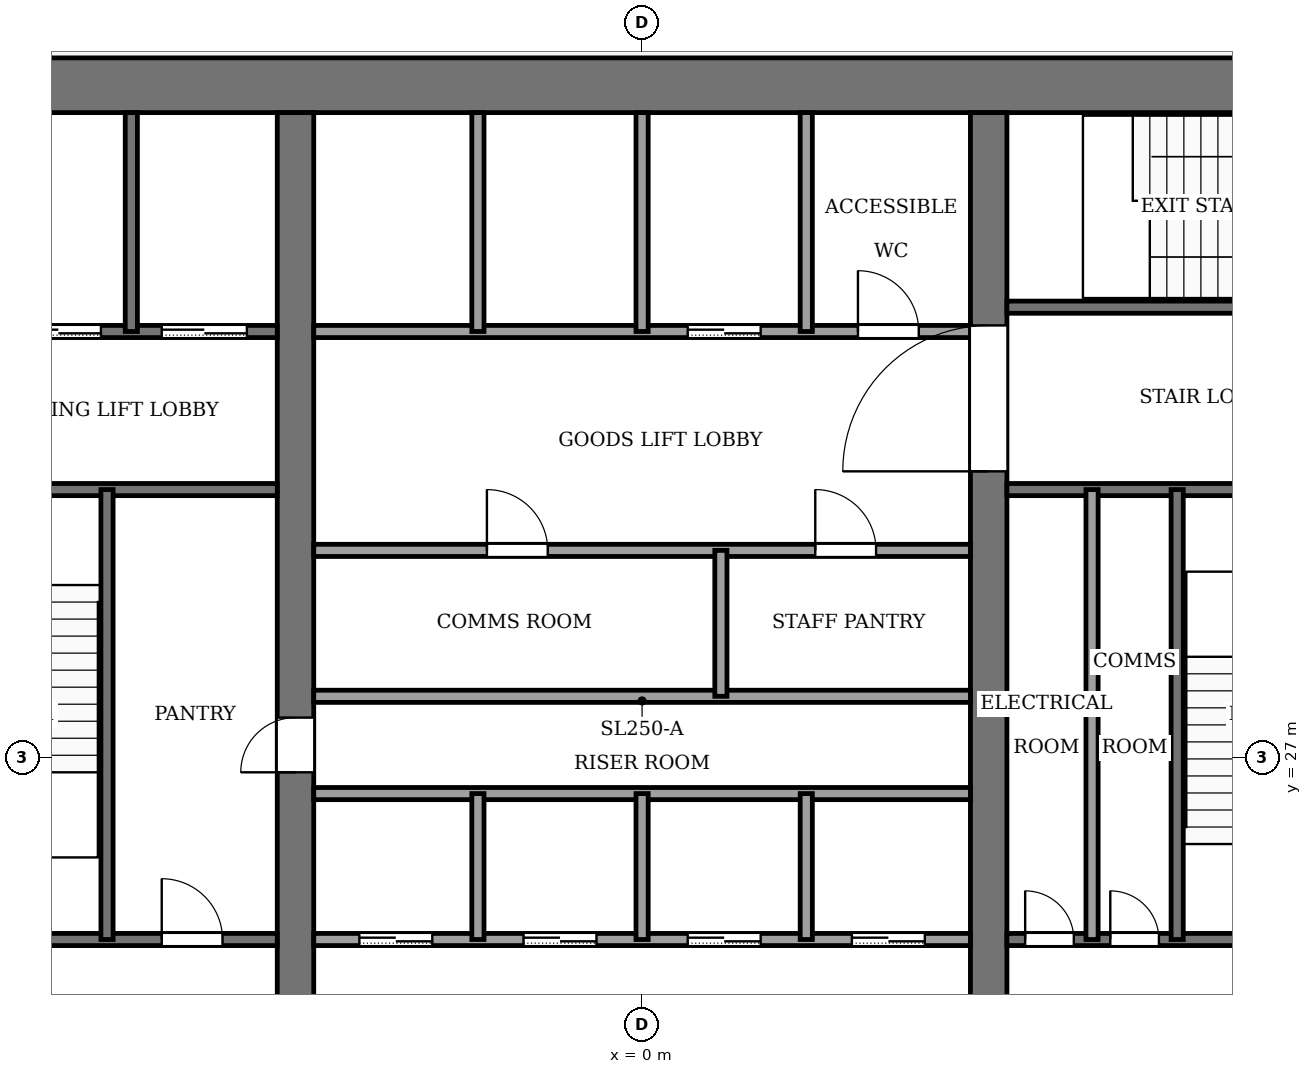
"""IFC4 building model, lengths in metres.
Left out: names, types, materials, properties, quantities, classifications, styles, units other than length and angle.
Written with IfcOpenShell. Run it as: python <this file> out.ifc"""

import sys

from ifc_helpers import new_model, si_unit, direction, frame, frame_2d, origin, place, context, subcontext, project, spatial, rectangle, extrude, element, fill, save


model = new_model("IFC4")
c1 = context("Model", 3, precision=1e-05, world=origin(), true_north=direction((0.0, 1.0)))
c2 = subcontext(c1, "Body", "Model", "MODEL_VIEW")
j1 = project(units=[si_unit("LENGTHUNIT", "METRE"), si_unit("PLANEANGLEUNIT", "RADIAN")], contexts=[c1])
p1 = place(None, origin())
s1 = spatial("IfcSite", under=j1, at=p1, CompositionType="ELEMENT")
p2 = place(p1, origin())
s2 = spatial("IfcBuilding", under=s1, at=p2, CompositionType="ELEMENT")
p3 = place(p2, frame((0.0, 0.0, 214.0)))
s3 = spatial("IfcBuildingStorey", under=s2, at=p3, CompositionType="ELEMENT", Elevation=214.0)
p4 = place(p3, frame((-13.5, 38.05, -0.13), z_axis=(0.0, 0.0, 1.0), x_axis=(1.0, 0.0, 0.0)))
e1 = element("IfcWall", 1, at=p4, inside=s3, PredefinedType="SHEAR", context=c2, shape_type="SweptSolid", body=[
    extrude(rectangle(XDim=27.0, YDim=0.9, at=frame_2d((13.5, 0.0))), origin(), (0.0, 0.0, 1.0), 4.0),
])
p5 = place(p3, frame((-5.7, 18.4, -0.13), z_axis=(0.0, 0.0, 1.0), x_axis=(0.0, 1.0, 0.0)))
e2 = element("IfcWall", 2, at=p5, inside=s3, PredefinedType="SHEAR", context=c2, shape_type="SweptSolid", body=[
    extrude(rectangle(XDim=19.2, YDim=0.6, at=frame_2d((9.6, 0.0))), origin(), (0.0, 0.0, 1.0), 4.0),
])
p6 = place(p5, frame((8.35, 0.0, 0.13)))
e3 = element("IfcOpeningElement", 3, at=p6, cuts=e2, PredefinedType="OPENING", context=c2, shape_type="SweptSolid", body=[
    extrude(rectangle(XDim=0.9, YDim=2.1, at=frame_2d((0.45, 1.05))), frame((0.0, 0.31, 0.0), z_axis=(0.0, -1.0, 0.0), x_axis=(1.0, 0.0, 0.0)), (0.0, 0.0, 1.0), 0.62),
])
p7 = place(p3, frame((5.7, 18.4, -0.13), z_axis=(0.0, 0.0, 1.0), x_axis=(0.0, 1.0, 0.0)))
e4 = element("IfcWall", 4, at=p7, inside=s3, PredefinedType="SHEAR", context=c2, shape_type="SweptSolid", body=[
    extrude(rectangle(XDim=19.2, YDim=0.6, at=frame_2d((9.6, 0.0))), origin(), (0.0, 0.0, 1.0), 4.0),
])
p8 = place(p7, frame((13.3, 0.0, 0.13)))
e5 = element("IfcOpeningElement", 5, at=p8, cuts=e4, PredefinedType="OPENING", context=c2, shape_type="SweptSolid", body=[
    extrude(rectangle(XDim=2.4, YDim=2.4, at=frame_2d((1.2, 1.2))), frame((0.0, 0.31, 0.0), z_axis=(0.0, -1.0, 0.0), x_axis=(1.0, 0.0, 0.0)), (0.0, 0.0, 1.0), 0.62),
])
p9 = place(p3, frame((-12.6, 24.0, 0.0), z_axis=(0.0, 0.0, 1.0), x_axis=(1.0, 0.0, 0.0)))
e6 = element("IfcWall", 6, at=p9, inside=s3, PredefinedType="PARTITIONING", context=c2, shape_type="SweptSolid", body=[
    extrude(rectangle(XDim=6.6, YDim=0.2, at=frame_2d((3.3, 0.0))), origin(), (0.0, 0.0, 1.0), 3.87),
])
p10 = place(p9, frame((4.7, 0.0, 0.0)))
e7 = element("IfcOpeningElement", 7, at=p10, cuts=e6, PredefinedType="OPENING", context=c2, shape_type="SweptSolid", body=[
    extrude(rectangle(XDim=1.0, YDim=2.1, at=frame_2d((0.5, 1.05))), frame((0.0, 0.11, 0.0), z_axis=(0.0, -1.0, 0.0), x_axis=(1.0, 0.0, 0.0)), (0.0, 0.0, 1.0), 0.22),
])
p11 = place(p3, frame((-5.4, 24.0, 0.0), z_axis=(0.0, 0.0, 1.0), x_axis=(1.0, 0.0, 0.0)))
e8 = element("IfcWall", 8, at=p11, inside=s3, PredefinedType="PARTITIONING", context=c2, shape_type="SweptSolid", body=[
    extrude(rectangle(XDim=10.8, YDim=0.2, at=frame_2d((5.4, 0.0))), origin(), (0.0, 0.0, 1.0), 3.87),
])
p12 = place(p11, frame((0.75, 0.0, 0.0)))
e9 = element("IfcOpeningElement", 9, at=p12, cuts=e8, PredefinedType="OPENING", context=c2, shape_type="SweptSolid", body=[
    extrude(rectangle(XDim=1.2, YDim=2.2, at=frame_2d((0.6, 1.1))), frame((0.0, 0.11, 0.0), z_axis=(0.0, -1.0, 0.0), x_axis=(1.0, 0.0, 0.0)), (0.0, 0.0, 1.0), 0.22),
])
p13 = place(p11, frame((3.45, 0.0, 0.0)))
e10 = element("IfcOpeningElement", 10, at=p13, cuts=e8, PredefinedType="OPENING", context=c2, shape_type="SweptSolid", body=[
    extrude(rectangle(XDim=1.2, YDim=2.2, at=frame_2d((0.6, 1.1))), frame((0.0, 0.11, 0.0), z_axis=(0.0, -1.0, 0.0), x_axis=(1.0, 0.0, 0.0)), (0.0, 0.0, 1.0), 0.22),
])
p14 = place(p11, frame((6.15, 0.0, 0.0)))
e11 = element("IfcOpeningElement", 11, at=p14, cuts=e8, PredefinedType="OPENING", context=c2, shape_type="SweptSolid", body=[
    extrude(rectangle(XDim=1.2, YDim=2.2, at=frame_2d((0.6, 1.1))), frame((0.0, 0.11, 0.0), z_axis=(0.0, -1.0, 0.0), x_axis=(1.0, 0.0, 0.0)), (0.0, 0.0, 1.0), 0.22),
])
p15 = place(p11, frame((8.85, 0.0, 0.0)))
e12 = element("IfcOpeningElement", 12, at=p15, cuts=e8, PredefinedType="OPENING", context=c2, shape_type="SweptSolid", body=[
    extrude(rectangle(XDim=1.2, YDim=2.2, at=frame_2d((0.6, 1.1))), frame((0.0, 0.11, 0.0), z_axis=(0.0, -1.0, 0.0), x_axis=(1.0, 0.0, 0.0)), (0.0, 0.0, 1.0), 0.22),
])
p16 = place(p3, frame((6.0, 24.0, 0.0), z_axis=(0.0, 0.0, 1.0), x_axis=(1.0, 0.0, 0.0)))
e13 = element("IfcWall", 13, at=p16, inside=s3, PredefinedType="PARTITIONING", context=c2, shape_type="SweptSolid", body=[
    extrude(rectangle(XDim=6.6, YDim=0.2, at=frame_2d((3.3, 0.0))), origin(), (0.0, 0.0, 1.0), 3.87),
])
p17 = place(p16, frame((0.3, 0.0, 0.0)))
e14 = element("IfcOpeningElement", 14, at=p17, cuts=e13, PredefinedType="OPENING", context=c2, shape_type="SweptSolid", body=[
    extrude(rectangle(XDim=0.8, YDim=2.1, at=frame_2d((0.4, 1.05))), frame((0.0, 0.11, 0.0), z_axis=(0.0, -1.0, 0.0), x_axis=(1.0, 0.0, 0.0)), (0.0, 0.0, 1.0), 0.22),
])
p18 = place(p16, frame((1.7, 0.0, 0.0)))
e15 = element("IfcOpeningElement", 15, at=p18, cuts=e13, PredefinedType="OPENING", context=c2, shape_type="SweptSolid", body=[
    extrude(rectangle(XDim=0.8, YDim=2.1, at=frame_2d((0.4, 1.05))), frame((0.0, 0.11, 0.0), z_axis=(0.0, -1.0, 0.0), x_axis=(1.0, 0.0, 0.0)), (0.0, 0.0, 1.0), 0.22),
])
p19 = place(p16, frame((4.4, 0.0, 0.0)))
e16 = element("IfcOpeningElement", 16, at=p19, cuts=e13, PredefinedType="OPENING", context=c2, shape_type="SweptSolid", body=[
    extrude(rectangle(XDim=1.2, YDim=2.2, at=frame_2d((0.6, 1.1))), frame((0.0, 0.11, 0.0), z_axis=(0.0, -1.0, 0.0), x_axis=(1.0, 0.0, 0.0)), (0.0, 0.0, 1.0), 0.22),
])
for number, where, z_axis, x_axis in (
    (17, (-5.4, 26.4, 0.0), (0.0, 0.0, 1.0), (1.0, 0.0, 0.0)),
    (18, (-5.4, 28.0, 0.0), (0.0, 0.0, 1.0), (1.0, 0.0, 0.0)),
):
    element("IfcWall", number, at=place(p3, frame(where, z_axis=z_axis, x_axis=x_axis)), inside=s3, PredefinedType="PARTITIONING", context=c2, shape_type="SweptSolid", body=[
        extrude(rectangle(XDim=10.8, YDim=0.2, at=frame_2d((5.4, 0.0))), origin(), (0.0, 0.0, 1.0), 3.87),
    ])
p20 = place(p3, frame((-5.4, 30.4, 0.0), z_axis=(0.0, 0.0, 1.0), x_axis=(1.0, 0.0, 0.0)))
e19 = element("IfcWall", 19, at=p20, inside=s3, PredefinedType="PARTITIONING", context=c2, shape_type="SweptSolid", body=[
    extrude(rectangle(XDim=10.8, YDim=0.2, at=frame_2d((5.4, 0.0))), origin(), (0.0, 0.0, 1.0), 3.87),
])
p21 = place(p20, frame((2.848, 0.0, 0.0)))
e20 = element("IfcOpeningElement", 20, at=p21, cuts=e19, PredefinedType="OPENING", context=c2, shape_type="SweptSolid", body=[
    extrude(rectangle(XDim=1.0, YDim=2.1, at=frame_2d((0.5, 1.05))), frame((0.0, 0.11, 0.0), z_axis=(0.0, -1.0, 0.0), x_axis=(1.0, 0.0, 0.0)), (0.0, 0.0, 1.0), 0.22),
])
p22 = place(p20, frame((8.248, 0.0, 0.0)))
e21 = element("IfcOpeningElement", 21, at=p22, cuts=e19, PredefinedType="OPENING", context=c2, shape_type="SweptSolid", body=[
    extrude(rectangle(XDim=1.0, YDim=2.1, at=frame_2d((0.5, 1.05))), frame((0.0, 0.11, 0.0), z_axis=(0.0, -1.0, 0.0), x_axis=(1.0, 0.0, 0.0)), (0.0, 0.0, 1.0), 0.22),
])
p23 = place(p3, frame((-12.6, 31.4, 0.0), z_axis=(0.0, 0.0, 1.0), x_axis=(1.0, 0.0, 0.0)))
e22 = element("IfcWall", 22, at=p23, inside=s3, PredefinedType="PARTITIONING", context=c2, shape_type="SweptSolid", body=[
    extrude(rectangle(XDim=6.6, YDim=0.2, at=frame_2d((3.3, 0.0))), origin(), (0.0, 0.0, 1.0), 3.87),
])
p24 = place(p23, frame((1.0, 0.0, 0.0)))
e23 = element("IfcOpeningElement", 23, at=p24, cuts=e22, PredefinedType="OPENING", context=c2, shape_type="SweptSolid", body=[
    extrude(rectangle(XDim=1.2, YDim=2.2, at=frame_2d((0.6, 1.1))), frame((0.0, 0.11, 0.0), z_axis=(0.0, -1.0, 0.0), x_axis=(1.0, 0.0, 0.0)), (0.0, 0.0, 1.0), 0.22),
])
p25 = place(p3, frame((6.0, 31.4, 0.0), z_axis=(0.0, 0.0, 1.0), x_axis=(1.0, 0.0, 0.0)))
e24 = element("IfcWall", 24, at=p25, inside=s3, PredefinedType="PARTITIONING", context=c2, shape_type="SweptSolid", body=[
    extrude(rectangle(XDim=6.6, YDim=0.2, at=frame_2d((3.3, 0.0))), origin(), (0.0, 0.0, 1.0), 3.87),
])
p26 = place(p3, frame((-12.6, 34.0, 0.0), z_axis=(0.0, 0.0, 1.0), x_axis=(1.0, 0.0, 0.0)))
e25 = element("IfcWall", 25, at=p26, inside=s3, PredefinedType="PARTITIONING", context=c2, shape_type="SweptSolid", body=[
    extrude(rectangle(XDim=6.6, YDim=0.2, at=frame_2d((3.3, 0.0))), origin(), (0.0, 0.0, 1.0), 3.87),
])
p27 = place(p26, frame((4.7, 0.0, 0.0)))
e26 = element("IfcOpeningElement", 26, at=p27, cuts=e25, PredefinedType="OPENING", context=c2, shape_type="SweptSolid", body=[
    extrude(rectangle(XDim=1.4, YDim=2.2, at=frame_2d((0.7, 1.1))), frame((0.0, 0.11, 0.0), z_axis=(0.0, -1.0, 0.0), x_axis=(1.0, 0.0, 0.0)), (0.0, 0.0, 1.0), 0.22),
])
p28 = place(p26, frame((2.3, 0.0, 0.0)))
e27 = element("IfcOpeningElement", 27, at=p28, cuts=e25, PredefinedType="OPENING", context=c2, shape_type="SweptSolid", body=[
    extrude(rectangle(XDim=1.4, YDim=2.2, at=frame_2d((0.7, 1.1))), frame((0.0, 0.11, 0.0), z_axis=(0.0, -1.0, 0.0), x_axis=(1.0, 0.0, 0.0)), (0.0, 0.0, 1.0), 0.22),
])
p29 = place(p26, frame((0.45, 0.0, 0.0)))
e28 = element("IfcOpeningElement", 28, at=p29, cuts=e25, PredefinedType="OPENING", context=c2, shape_type="SweptSolid", body=[
    extrude(rectangle(XDim=0.9, YDim=2.1, at=frame_2d((0.45, 1.05))), frame((0.0, 0.11, 0.0), z_axis=(0.0, -1.0, 0.0), x_axis=(1.0, 0.0, 0.0)), (0.0, 0.0, 1.0), 0.22),
])
p30 = place(p3, frame((-5.4, 34.0, 0.0), z_axis=(0.0, 0.0, 1.0), x_axis=(1.0, 0.0, 0.0)))
e29 = element("IfcWall", 29, at=p30, inside=s3, PredefinedType="PARTITIONING", context=c2, shape_type="SweptSolid", body=[
    extrude(rectangle(XDim=10.8, YDim=0.2, at=frame_2d((5.4, 0.0))), origin(), (0.0, 0.0, 1.0), 3.87),
])
p31 = place(p30, frame((6.15, 0.0, 0.0)))
e30 = element("IfcOpeningElement", 30, at=p31, cuts=e29, PredefinedType="OPENING", context=c2, shape_type="SweptSolid", body=[
    extrude(rectangle(XDim=1.2, YDim=2.2, at=frame_2d((0.6, 1.1))), frame((0.0, 0.11, 0.0), z_axis=(0.0, -1.0, 0.0), x_axis=(1.0, 0.0, 0.0)), (0.0, 0.0, 1.0), 0.22),
])
p32 = place(p30, frame((8.95, 0.0, 0.0)))
e31 = element("IfcOpeningElement", 31, at=p32, cuts=e29, PredefinedType="OPENING", context=c2, shape_type="SweptSolid", body=[
    extrude(rectangle(XDim=1.0, YDim=2.1, at=frame_2d((0.5, 1.05))), frame((0.0, 0.11, 0.0), z_axis=(0.0, -1.0, 0.0), x_axis=(1.0, 0.0, 0.0)), (0.0, 0.0, 1.0), 0.22),
])
p33 = place(p3, frame((6.0, 34.4, 0.0), z_axis=(0.0, 0.0, 1.0), x_axis=(1.0, 0.0, 0.0)))
e32 = element("IfcWall", 32, at=p33, inside=s3, PredefinedType="PARTITIONING", context=c2, shape_type="SweptSolid", body=[
    extrude(rectangle(XDim=6.6, YDim=0.2, at=frame_2d((3.3, 0.0))), origin(), (0.0, 0.0, 1.0), 3.87),
])
p34 = place(p33, frame((4.8, 0.0, 0.0)))
e33 = element("IfcOpeningElement", 33, at=p34, cuts=e32, PredefinedType="OPENING", context=c2, shape_type="SweptSolid", body=[
    extrude(rectangle(XDim=1.2, YDim=2.2, at=frame_2d((0.6, 1.1))), frame((0.0, 0.11, 0.0), z_axis=(0.0, -1.0, 0.0), x_axis=(1.0, 0.0, 0.0)), (0.0, 0.0, 1.0), 0.22),
])
p35 = place(p3, frame((-8.8, 24.0, 0.0), z_axis=(0.0, 0.0, 1.0), x_axis=(0.0, 1.0, 0.0)))
e34 = element("IfcWall", 34, at=p35, inside=s3, PredefinedType="PARTITIONING", context=c2, shape_type="SweptSolid", body=[
    extrude(rectangle(XDim=7.4, YDim=0.2, at=frame_2d((3.7, 0.0))), origin(), (0.0, 0.0, 1.0), 3.87),
])
p36 = place(p3, frame((-8.4, 34.0, 0.0), z_axis=(0.0, 0.0, 1.0), x_axis=(0.0, 1.0, 0.0)))
e35 = element("IfcWall", 35, at=p36, inside=s3, PredefinedType="PARTITIONING", context=c2, shape_type="SweptSolid", body=[
    extrude(rectangle(XDim=3.6, YDim=0.2, at=frame_2d((1.8, 0.0))), origin(), (0.0, 0.0, 1.0), 3.87),
])
p37 = place(p3, frame((-2.7, 24.0, 0.0), z_axis=(0.0, 0.0, 1.0), x_axis=(0.0, 1.0, 0.0)))
e36 = element("IfcWall", 36, at=p37, inside=s3, PredefinedType="PARTITIONING", context=c2, shape_type="SweptSolid", body=[
    extrude(rectangle(XDim=2.4, YDim=0.2, at=frame_2d((1.2, 0.0))), origin(), (0.0, 0.0, 1.0), 3.87),
])
p38 = place(p3, frame((-2.7, 34.0, 0.0), z_axis=(0.0, 0.0, 1.0), x_axis=(0.0, 1.0, 0.0)))
e37 = element("IfcWall", 37, at=p38, inside=s3, PredefinedType="PARTITIONING", context=c2, shape_type="SweptSolid", body=[
    extrude(rectangle(XDim=3.6, YDim=0.2, at=frame_2d((1.8, 0.0))), origin(), (0.0, 0.0, 1.0), 3.87),
])
p39 = place(p3, frame((0.0, 24.0, 0.0), z_axis=(0.0, 0.0, 1.0), x_axis=(0.0, 1.0, 0.0)))
e38 = element("IfcWall", 38, at=p39, inside=s3, PredefinedType="PARTITIONING", context=c2, shape_type="SweptSolid", body=[
    extrude(rectangle(XDim=2.4, YDim=0.2, at=frame_2d((1.2, 0.0))), origin(), (0.0, 0.0, 1.0), 3.87),
])
p40 = place(p3, frame((0.0, 34.0, 0.0), z_axis=(0.0, 0.0, 1.0), x_axis=(0.0, 1.0, 0.0)))
e39 = element("IfcWall", 39, at=p40, inside=s3, PredefinedType="PARTITIONING", context=c2, shape_type="SweptSolid", body=[
    extrude(rectangle(XDim=3.6, YDim=0.2, at=frame_2d((1.8, 0.0))), origin(), (0.0, 0.0, 1.0), 3.87),
])
for number, where, z_axis, x_axis in (
    (40, (1.296, 28.0, 0.0), (0.0, 0.0, 1.0), (0.0, 1.0, 0.0)),
    (41, (2.7, 24.0, 0.0), (0.0, 0.0, 1.0), (0.0, 1.0, 0.0)),
):
    element("IfcWall", number, at=place(p3, frame(where, z_axis=z_axis, x_axis=x_axis)), inside=s3, PredefinedType="PARTITIONING", context=c2, shape_type="SweptSolid", body=[
        extrude(rectangle(XDim=2.4, YDim=0.2, at=frame_2d((1.2, 0.0))), origin(), (0.0, 0.0, 1.0), 3.87),
    ])
p41 = place(p3, frame((2.7, 34.0, 0.0), z_axis=(0.0, 0.0, 1.0), x_axis=(0.0, 1.0, 0.0)))
e42 = element("IfcWall", 42, at=p41, inside=s3, PredefinedType="PARTITIONING", context=c2, shape_type="SweptSolid", body=[
    extrude(rectangle(XDim=3.6, YDim=0.2, at=frame_2d((1.8, 0.0))), origin(), (0.0, 0.0, 1.0), 3.87),
])
for number, where, z_axis, x_axis in (
    (43, (7.4, 24.0, 0.0), (0.0, 0.0, 1.0), (0.0, 1.0, 0.0)),
    (44, (8.8, 24.0, 0.0), (0.0, 0.0, 1.0), (0.0, 1.0, 0.0)),
):
    element("IfcWall", number, at=place(p3, frame(where, z_axis=z_axis, x_axis=x_axis)), inside=s3, PredefinedType="PARTITIONING", context=c2, shape_type="SweptSolid", body=[
        extrude(rectangle(XDim=7.4, YDim=0.2, at=frame_2d((3.7, 0.0))), origin(), (0.0, 0.0, 1.0), 3.87),
    ])
p42 = place(p12, origin())
e45 = element("IfcDoor", 45, at=p42, inside=s3, OperationType="SLIDING_TO_LEFT", PredefinedType="DOOR", context=c2, shape_type="SweptSolid", body=[
    extrude(rectangle(XDim=1.2, YDim=2.2, at=frame_2d((0.6, 1.1))), frame((0.0, 0.025, 0.0), z_axis=(0.0, -1.0, 0.0), x_axis=(1.0, 0.0, 0.0)), (0.0, 0.0, 1.0), 0.05),
])
fill(e9, e45)
p43 = place(p13, origin())
e46 = element("IfcDoor", 46, at=p43, inside=s3, OperationType="SLIDING_TO_LEFT", PredefinedType="DOOR", context=c2, shape_type="SweptSolid", body=[
    extrude(rectangle(XDim=1.2, YDim=2.2, at=frame_2d((0.6, 1.1))), frame((0.0, 0.025, 0.0), z_axis=(0.0, -1.0, 0.0), x_axis=(1.0, 0.0, 0.0)), (0.0, 0.0, 1.0), 0.05),
])
fill(e10, e46)
p44 = place(p14, origin())
e47 = element("IfcDoor", 47, at=p44, inside=s3, OperationType="SLIDING_TO_LEFT", PredefinedType="DOOR", context=c2, shape_type="SweptSolid", body=[
    extrude(rectangle(XDim=1.2, YDim=2.2, at=frame_2d((0.6, 1.1))), frame((0.0, 0.025, 0.0), z_axis=(0.0, -1.0, 0.0), x_axis=(1.0, 0.0, 0.0)), (0.0, 0.0, 1.0), 0.05),
])
fill(e11, e47)
p45 = place(p15, origin())
e48 = element("IfcDoor", 48, at=p45, inside=s3, OperationType="SLIDING_TO_LEFT", PredefinedType="DOOR", context=c2, shape_type="SweptSolid", body=[
    extrude(rectangle(XDim=1.2, YDim=2.2, at=frame_2d((0.6, 1.1))), frame((0.0, 0.025, 0.0), z_axis=(0.0, -1.0, 0.0), x_axis=(1.0, 0.0, 0.0)), (0.0, 0.0, 1.0), 0.05),
])
fill(e12, e48)
p46 = place(p31, origin())
e49 = element("IfcDoor", 49, at=p46, inside=s3, OperationType="SLIDING_TO_LEFT", PredefinedType="DOOR", context=c2, shape_type="SweptSolid", body=[
    extrude(rectangle(XDim=1.2, YDim=2.2, at=frame_2d((0.6, 1.1))), frame((0.0, 0.025, 0.0), z_axis=(0.0, -1.0, 0.0), x_axis=(1.0, 0.0, 0.0)), (0.0, 0.0, 1.0), 0.05),
])
fill(e30, e49)
p47 = place(p27, origin())
e50 = element("IfcDoor", 50, at=p47, inside=s3, OperationType="SLIDING_TO_LEFT", PredefinedType="DOOR", context=c2, shape_type="SweptSolid", body=[
    extrude(rectangle(XDim=1.4, YDim=2.2, at=frame_2d((0.7, 1.1))), frame((0.0, 0.025, 0.0), z_axis=(0.0, -1.0, 0.0), x_axis=(1.0, 0.0, 0.0)), (0.0, 0.0, 1.0), 0.05),
])
fill(e26, e50)
p48 = place(p28, origin())
e51 = element("IfcDoor", 51, at=p48, inside=s3, OperationType="SLIDING_TO_LEFT", PredefinedType="DOOR", context=c2, shape_type="SweptSolid", body=[
    extrude(rectangle(XDim=1.4, YDim=2.2, at=frame_2d((0.7, 1.1))), frame((0.0, 0.025, 0.0), z_axis=(0.0, -1.0, 0.0), x_axis=(1.0, 0.0, 0.0)), (0.0, 0.0, 1.0), 0.05),
])
fill(e27, e51)
p49 = place(p21, origin())
e52 = element("IfcDoor", 52, at=p49, inside=s3, OperationType="SINGLE_SWING_LEFT", PredefinedType="DOOR", context=c2, shape_type="SweptSolid", body=[
    extrude(rectangle(XDim=1.0, YDim=2.1, at=frame_2d((0.5, 1.05))), frame((0.0, 0.025, 0.0), z_axis=(0.0, -1.0, 0.0), x_axis=(1.0, 0.0, 0.0)), (0.0, 0.0, 1.0), 0.05),
])
fill(e20, e52)
p50 = place(p22, origin())
e53 = element("IfcDoor", 53, at=p50, inside=s3, OperationType="SINGLE_SWING_RIGHT", PredefinedType="DOOR", context=c2, shape_type="SweptSolid", body=[
    extrude(rectangle(XDim=1.0, YDim=2.1, at=frame_2d((0.5, 1.05))), frame((0.0, 0.025, 0.0), z_axis=(0.0, -1.0, 0.0), x_axis=(1.0, 0.0, 0.0)), (0.0, 0.0, 1.0), 0.05),
])
fill(e21, e53)
p51 = place(p10, origin())
e54 = element("IfcDoor", 54, at=p51, inside=s3, OperationType="SINGLE_SWING_RIGHT", PredefinedType="DOOR", context=c2, shape_type="SweptSolid", body=[
    extrude(rectangle(XDim=1.0, YDim=2.1, at=frame_2d((0.5, 1.05))), frame((0.0, 0.025, 0.0), z_axis=(0.0, -1.0, 0.0), x_axis=(1.0, 0.0, 0.0)), (0.0, 0.0, 1.0), 0.05),
])
fill(e7, e54)
p52 = place(p17, origin())
e55 = element("IfcDoor", 55, at=p52, inside=s3, OperationType="SINGLE_SWING_RIGHT", PredefinedType="DOOR", context=c2, shape_type="SweptSolid", body=[
    extrude(rectangle(XDim=0.8, YDim=2.1, at=frame_2d((0.4, 1.05))), frame((0.0, 0.025, 0.0), z_axis=(0.0, -1.0, 0.0), x_axis=(1.0, 0.0, 0.0)), (0.0, 0.0, 1.0), 0.05),
])
fill(e14, e55)
p53 = place(p18, origin())
e56 = element("IfcDoor", 56, at=p53, inside=s3, OperationType="SINGLE_SWING_LEFT", PredefinedType="DOOR", context=c2, shape_type="SweptSolid", body=[
    extrude(rectangle(XDim=0.8, YDim=2.1, at=frame_2d((0.4, 1.05))), frame((0.0, 0.025, 0.0), z_axis=(0.0, -1.0, 0.0), x_axis=(1.0, 0.0, 0.0)), (0.0, 0.0, 1.0), 0.05),
])
fill(e15, e56)
p54 = place(p32, origin())
e57 = element("IfcDoor", 57, at=p54, inside=s3, OperationType="SINGLE_SWING_LEFT", PredefinedType="DOOR", context=c2, shape_type="SweptSolid", body=[
    extrude(rectangle(XDim=1.0, YDim=2.1, at=frame_2d((0.5, 1.05))), frame((0.0, 0.025, 0.0), z_axis=(0.0, -1.0, 0.0), x_axis=(1.0, 0.0, 0.0)), (0.0, 0.0, 1.0), 0.05),
])
fill(e31, e57)
p55 = place(p6, origin())
e58 = element("IfcDoor", 58, at=p55, inside=s3, OperationType="SINGLE_SWING_LEFT", PredefinedType="DOOR", context=c2, shape_type="SweptSolid", body=[
    extrude(rectangle(XDim=0.9, YDim=2.1, at=frame_2d((0.45, 1.05))), frame((0.0, 0.025, 0.0), z_axis=(0.0, -1.0, 0.0), x_axis=(1.0, 0.0, 0.0)), (0.0, 0.0, 1.0), 0.05),
])
fill(e3, e58)
p56 = place(p8, origin())
e59 = element("IfcDoor", 59, at=p56, inside=s3, OperationType="DOUBLE_DOOR_SINGLE_SWING", PredefinedType="DOOR", context=c2, shape_type="SweptSolid", body=[
    extrude(rectangle(XDim=2.4, YDim=2.4, at=frame_2d((1.2, 1.2))), frame((0.0, 0.025, 0.0), z_axis=(0.0, -1.0, 0.0), x_axis=(1.0, 0.0, 0.0)), (0.0, 0.0, 1.0), 0.05),
])
fill(e5, e59)
save(model, sys.argv[1])
